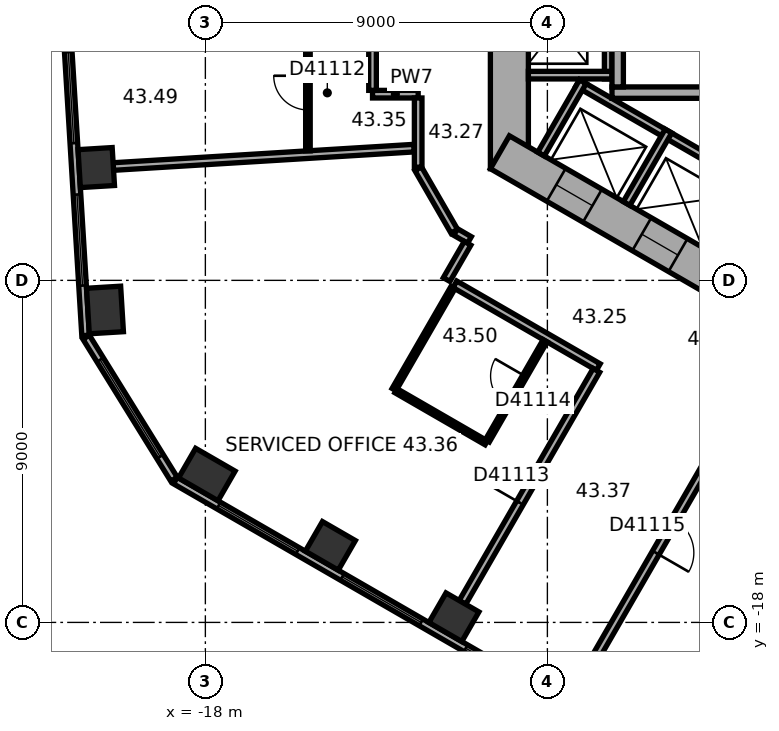
"""IFC4 building model, lengths in metres.
Left out: names, types, materials, properties, quantities, classifications, styles, units other than length and angle.
Written with IfcOpenShell. Run it as: python <this file> out.ifc"""

import sys

from ifc_helpers import new_model, si_unit, direction, frame, frame_2d, origin, origin_2d, place, context, subcontext, project, spatial, rectangle, extrude, element, fill, save


model = new_model("IFC4")
c1 = context("Model", 3, precision=1e-05, world=origin(), true_north=direction((0.0, 1.0)))
c2 = subcontext(c1, "Body", "Model", "MODEL_VIEW")
j1 = project(units=[si_unit("LENGTHUNIT", "METRE"), si_unit("PLANEANGLEUNIT", "RADIAN")], contexts=[c1])
p1 = place(None, origin())
s1 = spatial("IfcSite", under=j1, at=p1, CompositionType="ELEMENT")
p2 = place(p1, origin())
s2 = spatial("IfcBuilding", under=s1, at=p2, CompositionType="ELEMENT")
p3 = place(p2, frame((0.0, 0.0, 176.2)))
s3 = spatial("IfcBuildingStorey", under=s2, at=p3, CompositionType="ELEMENT", Elevation=176.2)
p4 = place(p3, frame((-20.871, -6.032, 0.0), z_axis=(0.0, 0.0, 1.0), x_axis=(0.061048539535, -0.998134798422, 0.0)))
e1 = element("IfcColumn", 1, at=p4, inside=s3, PredefinedType="COLUMN", context=c2, shape_type="SweptSolid", body=[
    extrude(rectangle(XDim=1.0, YDim=0.9, at=origin_2d()), origin(), (0.0, 0.0, 1.0), 3.7),
])
for number, where, z_axis, x_axis in (
    (2, (-20.642, -9.779, 0.0), (0.0, 0.0, 1.0), (0.061, -0.998, 0.0)),
    (3, (-17.962, -14.109, 0.0), (0.0, 0.0, 1.0), (0.866, -0.5, 0.0)),
):
    element("IfcColumn", number, at=place(p3, frame(where, z_axis=z_axis, x_axis=x_axis)), inside=s3, PredefinedType="COLUMN", context=c2, shape_type="SweptSolid", body=[
        extrude(rectangle(XDim=1.2, YDim=0.9, at=origin_2d()), origin(), (0.0, 0.0, 1.0), 3.7),
    ])
for number, where, z_axis, x_axis in (
    (4, (-14.711, -15.986, 0.0), (0.0, 0.0, 1.0), (0.866, -0.5, 0.0)),
    (5, (-11.46, -17.863, 0.0), (0.0, 0.0, 1.0), (0.866, -0.5, 0.0)),
):
    element("IfcColumn", number, at=place(p3, frame(where, z_axis=z_axis, x_axis=x_axis)), inside=s3, PredefinedType="COLUMN", context=c2, shape_type="SweptSolid", body=[
        extrude(rectangle(XDim=1.0, YDim=0.9, at=origin_2d()), origin(), (0.0, 0.0, 1.0), 3.7),
    ])
p5 = place(p3, frame((-10.0, 6.062, 0.0), z_axis=(0.0, 0.0, 1.0), x_axis=(0.0, -1.0, 0.0)))
e6 = element("IfcWall", 6, at=p5, inside=s3, PredefinedType="SHEAR", context=c2, shape_type="SweptSolid", body=[
    extrude(rectangle(XDim=12.125, YDim=1.0, at=frame_2d((6.062, 0.0))), origin(), (0.0, 0.0, 1.0), 3.7),
])
p6 = place(p5, frame((5.212, 0.0, 0.0)))
e7 = element("IfcOpeningElement", 7, at=p6, cuts=e6, PredefinedType="OPENING", context=c2, shape_type="SweptSolid", body=[
    extrude(rectangle(XDim=1.1, YDim=2.1, at=frame_2d((0.55, 1.05))), frame((0.0, 0.51, 0.0), z_axis=(0.0, -1.0, 0.0), x_axis=(1.0, 0.0, 0.0)), (0.0, 0.0, 1.0), 1.02),
])
p7 = place(p5, frame((7.812, 0.0, 0.0)))
e8 = element("IfcOpeningElement", 8, at=p7, cuts=e6, PredefinedType="OPENING", context=c2, shape_type="SweptSolid", body=[
    extrude(rectangle(XDim=1.1, YDim=2.1, at=frame_2d((0.55, 1.05))), frame((0.0, 0.51, 0.0), z_axis=(0.0, -1.0, 0.0), x_axis=(1.0, 0.0, 0.0)), (0.0, 0.0, 1.0), 1.02),
])
p8 = place(p3, frame((-10.25, -5.629, 0.0), z_axis=(0.0, 0.0, 1.0), x_axis=(0.866022616891, -0.50000482701, 0.0)))
e9 = element("IfcWall", 9, at=p8, inside=s3, PredefinedType="SHEAR", context=c2, shape_type="SweptSolid", body=[
    extrude(rectangle(XDim=12.125, YDim=1.0, at=frame_2d((6.062, 0.0))), origin(), (0.0, 0.0, 1.0), 3.7),
])
p9 = place(p8, frame((6.262, 0.0, 0.0)))
e10 = element("IfcOpeningElement", 10, at=p9, cuts=e9, PredefinedType="OPENING", context=c2, shape_type="SweptSolid", body=[
    extrude(rectangle(XDim=1.5, YDim=2.1, at=frame_2d((0.75, 1.05))), frame((0.0, 0.51, 0.0), z_axis=(0.0, -1.0, 0.0), x_axis=(1.0, 0.0, 0.0)), (0.0, 0.0, 1.0), 1.02),
])
p10 = place(p8, frame((1.712, 0.0, 0.0)))
e11 = element("IfcOpeningElement", 11, at=p10, cuts=e9, PredefinedType="OPENING", context=c2, shape_type="SweptSolid", body=[
    extrude(rectangle(XDim=1.1, YDim=2.1, at=frame_2d((0.55, 1.05))), frame((0.0, 0.51, 0.0), z_axis=(0.0, -1.0, 0.0), x_axis=(1.0, 0.0, 0.0)), (0.0, 0.0, 1.0), 1.02),
])
p11 = place(p8, frame((4.312, 0.0, 0.0)))
e12 = element("IfcOpeningElement", 12, at=p11, cuts=e9, PredefinedType="OPENING", context=c2, shape_type="SweptSolid", body=[
    extrude(rectangle(XDim=1.1, YDim=2.1, at=frame_2d((0.55, 1.05))), frame((0.0, 0.51, 0.0), z_axis=(0.0, -1.0, 0.0), x_axis=(1.0, 0.0, 0.0)), (0.0, 0.0, 1.0), 1.02),
])
p12 = place(p3, frame((-22.375, 9.557, 0.0), z_axis=(0.0, 0.0, 1.0), x_axis=(0.061036015339, -0.998135564356, 0.0)))
e13 = element("IfcWall", 13, at=p12, inside=s3, PredefinedType="STANDARD", context=c2, shape_type="SweptSolid", body=[
    extrude(rectangle(XDim=20.044, YDim=0.2, at=frame_2d((10.022, 0.0))), origin(), (0.0, 0.0, 1.0), 3.7),
])
p13 = place(p12, frame((1.313, 0.0, 0.9)))
e14 = element("IfcOpeningElement", 14, at=p13, cuts=e13, PredefinedType="OPENING", context=c2, shape_type="SweptSolid", body=[
    extrude(rectangle(XDim=2.4, YDim=2.0, at=frame_2d((1.2, 1.0))), frame((0.0, 0.11, 0.0), z_axis=(0.0, -1.0, 0.0), x_axis=(1.0, 0.0, 0.0)), (0.0, 0.0, 1.0), 0.22),
])
p14 = place(p12, frame((5.067, 0.0, 0.9)))
e15 = element("IfcOpeningElement", 15, at=p14, cuts=e13, PredefinedType="OPENING", context=c2, shape_type="SweptSolid", body=[
    extrude(rectangle(XDim=2.4, YDim=2.0, at=frame_2d((1.2, 1.0))), frame((0.0, 0.11, 0.0), z_axis=(0.0, -1.0, 0.0), x_axis=(1.0, 0.0, 0.0)), (0.0, 0.0, 1.0), 0.22),
])
p15 = place(p12, frame((8.821, 0.0, 0.9)))
e16 = element("IfcOpeningElement", 16, at=p15, cuts=e13, PredefinedType="OPENING", context=c2, shape_type="SweptSolid", body=[
    extrude(rectangle(XDim=2.4, YDim=2.0, at=frame_2d((1.2, 1.0))), frame((0.0, 0.11, 0.0), z_axis=(0.0, -1.0, 0.0), x_axis=(1.0, 0.0, 0.0)), (0.0, 0.0, 1.0), 0.22),
])
p16 = place(p12, frame((12.575, 0.0, 0.9)))
e17 = element("IfcOpeningElement", 17, at=p16, cuts=e13, PredefinedType="OPENING", context=c2, shape_type="SweptSolid", body=[
    extrude(rectangle(XDim=2.4, YDim=2.0, at=frame_2d((1.2, 1.0))), frame((0.0, 0.11, 0.0), z_axis=(0.0, -1.0, 0.0), x_axis=(1.0, 0.0, 0.0)), (0.0, 0.0, 1.0), 0.22),
])
p17 = place(p12, frame((16.329, 0.0, 0.9)))
e18 = element("IfcOpeningElement", 18, at=p17, cuts=e13, PredefinedType="OPENING", context=c2, shape_type="SweptSolid", body=[
    extrude(rectangle(XDim=2.4, YDim=2.0, at=frame_2d((1.2, 1.0))), frame((0.0, 0.11, 0.0), z_axis=(0.0, -1.0, 0.0), x_axis=(1.0, 0.0, 0.0)), (0.0, 0.0, 1.0), 0.22),
])
p18 = place(p3, frame((-21.137, -10.496, 0.0), z_axis=(0.0, 0.0, 1.0), x_axis=(0.526178661629, -0.850374044786, 0.0)))
e19 = element("IfcWall", 19, at=p18, inside=s3, PredefinedType="STANDARD", context=c2, shape_type="SweptSolid", body=[
    extrude(rectangle(XDim=4.395, YDim=0.2, at=frame_2d((2.197, 0.0))), origin(), (0.0, 0.0, 1.0), 3.7),
])
p19 = place(p18, frame((0.698, 0.0, 0.9)))
e20 = element("IfcOpeningElement", 20, at=p19, cuts=e19, PredefinedType="OPENING", context=c2, shape_type="SweptSolid", body=[
    extrude(rectangle(XDim=3.0, YDim=2.0, at=frame_2d((1.5, 1.0))), frame((0.0, 0.11, 0.0), z_axis=(0.0, -1.0, 0.0), x_axis=(1.0, 0.0, 0.0)), (0.0, 0.0, 1.0), 0.22),
])
p20 = place(p3, frame((-18.789, -14.267, 0.0), z_axis=(0.0, 0.0, 1.0), x_axis=(0.866023315909, -0.500003616288, 0.0)))
e21 = element("IfcWall", 21, at=p20, inside=s3, PredefinedType="STANDARD", context=c2, shape_type="SweptSolid", body=[
    extrude(rectangle(XDim=20.044, YDim=0.2, at=frame_2d((10.022, 0.0))), origin(), (0.0, 0.0, 1.0), 3.7),
])
p21 = place(p20, frame((1.314, 0.0, 0.9)))
e22 = element("IfcOpeningElement", 22, at=p21, cuts=e21, PredefinedType="OPENING", context=c2, shape_type="SweptSolid", body=[
    extrude(rectangle(XDim=2.4, YDim=2.0, at=frame_2d((1.2, 1.0))), frame((0.0, 0.11, 0.0), z_axis=(0.0, -1.0, 0.0), x_axis=(1.0, 0.0, 0.0)), (0.0, 0.0, 1.0), 0.22),
])
p22 = place(p20, frame((5.069, 0.0, 0.9)))
e23 = element("IfcOpeningElement", 23, at=p22, cuts=e21, PredefinedType="OPENING", context=c2, shape_type="SweptSolid", body=[
    extrude(rectangle(XDim=2.4, YDim=2.0, at=frame_2d((1.2, 1.0))), frame((0.0, 0.11, 0.0), z_axis=(0.0, -1.0, 0.0), x_axis=(1.0, 0.0, 0.0)), (0.0, 0.0, 1.0), 0.22),
])
p23 = place(p20, frame((8.823, 0.0, 0.9)))
e24 = element("IfcOpeningElement", 24, at=p23, cuts=e21, PredefinedType="OPENING", context=c2, shape_type="SweptSolid", body=[
    extrude(rectangle(XDim=2.4, YDim=2.0, at=frame_2d((1.2, 1.0))), frame((0.0, 0.11, 0.0), z_axis=(0.0, -1.0, 0.0), x_axis=(1.0, 0.0, 0.0)), (0.0, 0.0, 1.0), 0.22),
])
p24 = place(p20, frame((12.577, 0.0, 0.9)))
e25 = element("IfcOpeningElement", 25, at=p24, cuts=e21, PredefinedType="OPENING", context=c2, shape_type="SweptSolid", body=[
    extrude(rectangle(XDim=2.4, YDim=2.0, at=frame_2d((1.2, 1.0))), frame((0.0, 0.11, 0.0), z_axis=(0.0, -1.0, 0.0), x_axis=(1.0, 0.0, 0.0)), (0.0, 0.0, 1.0), 0.22),
])
p25 = place(p20, frame((16.331, 0.0, 0.9)))
e26 = element("IfcOpeningElement", 26, at=p25, cuts=e21, PredefinedType="OPENING", context=c2, shape_type="SweptSolid", body=[
    extrude(rectangle(XDim=2.4, YDim=2.0, at=frame_2d((1.2, 1.0))), frame((0.0, 0.11, 0.0), z_axis=(0.0, -1.0, 0.0), x_axis=(1.0, 0.0, 0.0)), (0.0, 0.0, 1.0), 0.22),
])
p26 = place(p3, frame((-7.4, 4.3, 0.0), z_axis=(0.0, 0.0, 1.0), x_axis=(0.0, -1.0, 0.0)))
e27 = element("IfcWall", 27, at=p26, inside=s3, PredefinedType="PARTITIONING", context=c2, shape_type="SweptSolid", body=[
    extrude(rectangle(XDim=8.0, YDim=0.2, at=frame_2d((4.0, 0.0))), origin(), (0.0, 0.0, 1.0), 3.42),
])
p27 = place(p3, frame((-7.3, -3.6, 0.0), z_axis=(0.0, 0.0, 1.0), x_axis=(-1.0, 0.0, 0.0)))
e28 = element("IfcWall", 28, at=p27, inside=s3, PredefinedType="PARTITIONING", context=c2, shape_type="SweptSolid", body=[
    extrude(rectangle(XDim=2.2, YDim=0.2, at=frame_2d((1.1, 0.0))), origin(), (0.0, 0.0, 1.0), 3.42),
])
p28 = place(p3, frame((-8.203, -3.809, 0.0), z_axis=(0.0, 0.0, 1.0), x_axis=(0.866028230842, -0.499995103361, 0.0)))
e29 = element("IfcWall", 29, at=p28, inside=s3, PredefinedType="PARTITIONING", context=c2, shape_type="SweptSolid", body=[
    extrude(rectangle(XDim=5.4, YDim=0.2, at=frame_2d((2.7, 0.0))), origin(), (0.0, 0.0, 1.0), 3.42),
])
for number, where, z_axis, x_axis in (
    (30, (-8.067, -3.772, 0.0), (0.0, 0.0, 1.0), (-0.5, -0.866, 0.0)),
    (31, (-5.815, -5.072, 0.0), (0.0, 0.0, 1.0), (-0.5, -0.866, 0.0)),
):
    element("IfcWall", number, at=place(p3, frame(where, z_axis=z_axis, x_axis=x_axis)), inside=s3, PredefinedType="PARTITIONING", context=c2, shape_type="SweptSolid", body=[
        extrude(rectangle(XDim=2.2, YDim=0.2, at=frame_2d((1.1, 0.0))), origin(), (0.0, 0.0, 1.0), 3.42),
    ])
p29 = place(p3, frame((-2.6, -4.06, 0.0), z_axis=(0.0, 0.0, 1.0), x_axis=(-1.0, 0.0, 0.0)))
e32 = element("IfcWall", 32, at=p29, inside=s3, PredefinedType="SHEAR", context=c2, shape_type="SweptSolid", body=[
    extrude(rectangle(XDim=4.7, YDim=0.3, at=frame_2d((2.35, 0.0))), origin(), (0.0, 0.0, 1.0), 3.42),
])
p30 = place(p3, frame((-7.15, 3.15, 0.0), z_axis=(0.0, 0.0, 1.0), x_axis=(0.0, -1.0, 0.0)))
e33 = element("IfcWall", 33, at=p30, inside=s3, PredefinedType="SHEAR", context=c2, shape_type="SweptSolid", body=[
    extrude(rectangle(XDim=7.06, YDim=0.3, at=frame_2d((3.53, 0.0))), origin(), (0.0, 0.0, 1.0), 3.42),
])
p31 = place(p3, frame((-20.421, -6.005, 0.0), z_axis=(0.0, 0.0, 1.0), x_axis=(0.998134865741, 0.061047438866, 0.0)))
e34 = element("IfcWall", 34, at=p31, inside=s3, PredefinedType="PARTITIONING", context=c2, shape_type="SweptSolid", body=[
    extrude(rectangle(XDim=7.927, YDim=0.2, at=frame_2d((3.963, 0.0))), origin(), (0.0, 0.0, 1.0), 2.87),
])
p32 = place(p3, frame((-15.301, 1.731, 0.0), z_axis=(0.0, 0.0, 1.0), x_axis=(0.0, -1.0, 0.0)))
e35 = element("IfcWall", 35, at=p32, inside=s3, PredefinedType="PARTITIONING", context=c2, shape_type="SweptSolid", body=[
    extrude(rectangle(XDim=7.322, YDim=0.12, at=frame_2d((3.661, 0.0))), origin(), (0.0, 0.0, 1.0), 3.42),
])
p33 = place(p32, frame((0.55, 0.0, 0.0)))
e36 = element("IfcOpeningElement", 36, at=p33, cuts=e35, PredefinedType="OPENING", context=c2, shape_type="SweptSolid", body=[
    extrude(rectangle(XDim=1.0, YDim=2.1, at=frame_2d((0.5, 1.05))), frame((0.0, 0.07, 0.0), z_axis=(0.0, -1.0, 0.0), x_axis=(1.0, 0.0, 0.0)), (0.0, 0.0, 1.0), 0.14),
])
p34 = place(p32, frame((2.736, 0.0, 0.0)))
e37 = element("IfcOpeningElement", 37, at=p34, cuts=e35, PredefinedType="OPENING", context=c2, shape_type="SweptSolid", body=[
    extrude(rectangle(XDim=0.9, YDim=2.1, at=frame_2d((0.45, 1.05))), frame((0.0, 0.07, 0.0), z_axis=(0.0, -1.0, 0.0), x_axis=(1.0, 0.0, 0.0)), (0.0, 0.0, 1.0), 0.14),
])
p35 = place(p32, frame((5.347, 0.0, 0.0)))
e38 = element("IfcOpeningElement", 38, at=p35, cuts=e35, PredefinedType="OPENING", context=c2, shape_type="SweptSolid", body=[
    extrude(rectangle(XDim=0.9, YDim=2.1, at=frame_2d((0.45, 1.05))), frame((0.0, 0.07, 0.0), z_axis=(0.0, -1.0, 0.0), x_axis=(1.0, 0.0, 0.0)), (0.0, 0.0, 1.0), 0.14),
])
p36 = place(p3, frame((-13.601, -4.101, 0.0), z_axis=(0.0, 0.0, 1.0), x_axis=(1.0, 0.0, 0.0)))
e39 = element("IfcWall", 39, at=p36, inside=s3, PredefinedType="PARTITIONING", context=c2, shape_type="SweptSolid", body=[
    extrude(rectangle(XDim=1.201, YDim=0.2, at=frame_2d((0.601, 0.0))), origin(), (0.0, 0.0, 1.0), 3.42),
])
p37 = place(p3, frame((-13.601, 1.935, 0.0), z_axis=(0.0, 0.0, 1.0), x_axis=(0.0, -1.0, 0.0)))
e40 = element("IfcWall", 40, at=p37, inside=s3, PredefinedType="PARTITIONING", context=c2, shape_type="SweptSolid", body=[
    extrude(rectangle(XDim=5.936, YDim=0.2, at=frame_2d((2.968, 0.0))), origin(), (0.0, 0.0, 1.0), 3.42),
])
p38 = place(p37, frame((2.468, 0.0, 0.0)))
e41 = element("IfcOpeningElement", 41, at=p38, cuts=e40, PredefinedType="OPENING", context=c2, shape_type="SweptSolid", body=[
    extrude(rectangle(XDim=1.0, YDim=2.1, at=frame_2d((0.5, 1.05))), frame((0.0, 0.11, 0.0), z_axis=(0.0, -1.0, 0.0), x_axis=(1.0, 0.0, 0.0)), (0.0, 0.0, 1.0), 0.22),
])
p39 = place(p3, frame((-13.035, -11.875, 0.0), z_axis=(0.0, 0.0, 1.0), x_axis=(0.500026960575, 0.86600983753, 0.0)))
e42 = element("IfcWall", 42, at=p39, inside=s3, PredefinedType="PARTITIONING", context=c2, shape_type="SweptSolid", body=[
    extrude(rectangle(XDim=3.1, YDim=0.12, at=frame_2d((1.55, 0.0))), origin(), (0.0, 0.0, 1.0), 3.42),
])
p40 = place(p3, frame((-12.4, -6.062, 0.0), z_axis=(0.0, 0.0, 1.0), x_axis=(0.500022797313, -0.86601224135, 0.0)))
e43 = element("IfcWall", 43, at=p40, inside=s3, PredefinedType="PARTITIONING", context=c2, shape_type="SweptSolid", body=[
    extrude(rectangle(XDim=1.9, YDim=0.2, at=frame_2d((0.95, 0.0))), origin(), (0.0, 0.0, 1.0), 3.42),
])
p41 = place(p3, frame((-12.4, -4.201, 0.0), z_axis=(0.0, 0.0, 1.0), x_axis=(0.0, -1.0, 0.0)))
e44 = element("IfcWall", 44, at=p41, inside=s3, PredefinedType="PARTITIONING", context=c2, shape_type="SweptSolid", body=[
    extrude(rectangle(XDim=1.821, YDim=0.2, at=frame_2d((0.911, 0.0))), origin(), (0.0, 0.0, 1.0), 3.42),
])
p42 = place(p3, frame((-11.435, -9.103, 0.0), z_axis=(0.0, 0.0, 1.0), x_axis=(0.866007399799, -0.500031182522, 0.0)))
e45 = element("IfcWall", 45, at=p42, inside=s3, PredefinedType="PARTITIONING", context=c2, shape_type="SweptSolid", body=[
    extrude(rectangle(XDim=4.358, YDim=0.2, at=frame_2d((2.179, 0.0))), origin(), (0.0, 0.0, 1.0), 3.42),
])
p43 = place(p3, frame((-11.415, -7.728, 0.0), z_axis=(0.0, 0.0, 1.0), x_axis=(0.865915281873, -0.500190688257, 0.0)))
e46 = element("IfcWall", 46, at=p43, inside=s3, PredefinedType="PARTITIONING", context=c2, shape_type="SweptSolid", body=[
    extrude(rectangle(XDim=0.421, YDim=0.2, at=frame_2d((0.21, 0.0))), origin(), (0.0, 0.0, 1.0), 3.42),
])
p44 = place(p3, frame((-11.235, -17.474, 0.0), z_axis=(0.0, 0.0, 1.0), x_axis=(0.500009260695, 0.866020057054, 0.0)))
e47 = element("IfcWall", 47, at=p44, inside=s3, PredefinedType="PARTITIONING", context=c2, shape_type="SweptSolid", body=[
    extrude(rectangle(XDim=7.049, YDim=0.2, at=frame_2d((3.524, 0.0))), origin(), (0.0, 0.0, 1.0), 2.87),
])
p45 = place(p44, frame((3.024, 0.0, 0.0)))
e48 = element("IfcOpeningElement", 48, at=p45, cuts=e47, PredefinedType="OPENING", context=c2, shape_type="SweptSolid", body=[
    extrude(rectangle(XDim=1.0, YDim=2.1, at=frame_2d((0.5, 1.05))), frame((0.0, 0.11, 0.0), z_axis=(0.0, -1.0, 0.0), x_axis=(1.0, 0.0, 0.0)), (0.0, 0.0, 1.0), 0.22),
])
p46 = place(p3, frame((-11.101, -8.025, 0.0), z_axis=(0.0, 0.0, 1.0), x_axis=(-0.500074377092, -0.865982457891, 0.0)))
e49 = element("IfcWall", 49, at=p46, inside=s3, PredefinedType="PARTITIONING", context=c2, shape_type="SweptSolid", body=[
    extrude(rectangle(XDim=1.101, YDim=0.2, at=frame_2d((0.55, 0.0))), origin(), (0.0, 0.0, 1.0), 3.42),
])
p47 = place(p3, frame((-10.61, -13.275, 0.0), z_axis=(0.0, 0.0, 1.0), x_axis=(-0.866019409031, 0.500010383074, 0.0)))
e50 = element("IfcWall", 50, at=p47, inside=s3, PredefinedType="PARTITIONING", context=c2, shape_type="SweptSolid", body=[
    extrude(rectangle(XDim=2.74, YDim=0.12, at=frame_2d((1.37, 0.0))), origin(), (0.0, 0.0, 1.0), 3.42),
])
p48 = place(p3, frame((-9.06, -10.59, 0.0), z_axis=(0.0, 0.0, 1.0), x_axis=(-0.49993101378, -0.866065229334, 0.0)))
e51 = element("IfcWall", 51, at=p48, inside=s3, PredefinedType="PARTITIONING", context=c2, shape_type="SweptSolid", body=[
    extrude(rectangle(XDim=3.04, YDim=0.12, at=frame_2d((1.52, 0.0))), origin(), (0.0, 0.0, 1.0), 3.42),
])
p49 = place(p48, frame((1.07, 0.0, 0.0)))
e52 = element("IfcOpeningElement", 52, at=p49, cuts=e51, PredefinedType="OPENING", context=c2, shape_type="SweptSolid", body=[
    extrude(rectangle(XDim=0.9, YDim=2.1, at=frame_2d((0.45, 1.05))), frame((0.0, 0.07, 0.0), z_axis=(0.0, -1.0, 0.0), x_axis=(1.0, 0.0, 0.0)), (0.0, 0.0, 1.0), 0.14),
])
p50 = place(p3, frame((-7.984, -19.351, 0.0), z_axis=(0.0, 0.0, 1.0), x_axis=(0.500010139422, 0.866019549707, 0.0)))
e53 = element("IfcWall", 53, at=p50, inside=s3, PredefinedType="PARTITIONING", context=c2, shape_type="SweptSolid", body=[
    extrude(rectangle(XDim=8.35, YDim=0.2, at=frame_2d((4.175, 0.0))), origin(), (0.0, 0.0, 1.0), 3.42),
])
p51 = place(p50, frame((3.675, 0.0, 0.0)))
e54 = element("IfcOpeningElement", 54, at=p51, cuts=e53, PredefinedType="OPENING", context=c2, shape_type="SweptSolid", body=[
    extrude(rectangle(XDim=1.0, YDim=2.1, at=frame_2d((0.5, 1.05))), frame((0.0, 0.11, 0.0), z_axis=(0.0, -1.0, 0.0), x_axis=(1.0, 0.0, 0.0)), (0.0, 0.0, 1.0), 0.22),
])
p52 = place(p16, origin())
e55 = element("IfcWindow", 55, at=p52, inside=s3, PartitioningType="SINGLE_PANEL", PredefinedType="WINDOW", context=c2, shape_type="SweptSolid", body=[
    extrude(rectangle(XDim=2.4, YDim=2.0, at=frame_2d((1.2, 1.0))), frame((0.0, 0.03, 0.0), z_axis=(0.0, -1.0, 0.0), x_axis=(1.0, 0.0, 0.0)), (0.0, 0.0, 1.0), 0.06),
])
fill(e17, e55)
p53 = place(p17, origin())
e56 = element("IfcWindow", 56, at=p53, inside=s3, PartitioningType="SINGLE_PANEL", PredefinedType="WINDOW", context=c2, shape_type="SweptSolid", body=[
    extrude(rectangle(XDim=2.4, YDim=2.0, at=frame_2d((1.2, 1.0))), frame((0.0, 0.03, 0.0), z_axis=(0.0, -1.0, 0.0), x_axis=(1.0, 0.0, 0.0)), (0.0, 0.0, 1.0), 0.06),
])
fill(e18, e56)
p54 = place(p19, origin())
e57 = element("IfcWindow", 57, at=p54, inside=s3, PartitioningType="SINGLE_PANEL", PredefinedType="WINDOW", context=c2, shape_type="SweptSolid", body=[
    extrude(rectangle(XDim=3.0, YDim=2.0, at=frame_2d((1.5, 1.0))), frame((0.0, 0.03, 0.0), z_axis=(0.0, -1.0, 0.0), x_axis=(1.0, 0.0, 0.0)), (0.0, 0.0, 1.0), 0.06),
])
fill(e20, e57)
p55 = place(p21, origin())
e58 = element("IfcWindow", 58, at=p55, inside=s3, PartitioningType="SINGLE_PANEL", PredefinedType="WINDOW", context=c2, shape_type="SweptSolid", body=[
    extrude(rectangle(XDim=2.4, YDim=2.0, at=frame_2d((1.2, 1.0))), frame((0.0, 0.03, 0.0), z_axis=(0.0, -1.0, 0.0), x_axis=(1.0, 0.0, 0.0)), (0.0, 0.0, 1.0), 0.06),
])
fill(e22, e58)
p56 = place(p22, origin())
e59 = element("IfcWindow", 59, at=p56, inside=s3, PartitioningType="SINGLE_PANEL", PredefinedType="WINDOW", context=c2, shape_type="SweptSolid", body=[
    extrude(rectangle(XDim=2.4, YDim=2.0, at=frame_2d((1.2, 1.0))), frame((0.0, 0.03, 0.0), z_axis=(0.0, -1.0, 0.0), x_axis=(1.0, 0.0, 0.0)), (0.0, 0.0, 1.0), 0.06),
])
fill(e23, e59)
p57 = place(p23, origin())
e60 = element("IfcWindow", 60, at=p57, inside=s3, PartitioningType="SINGLE_PANEL", PredefinedType="WINDOW", context=c2, shape_type="SweptSolid", body=[
    extrude(rectangle(XDim=2.4, YDim=2.0, at=frame_2d((1.2, 1.0))), frame((0.0, 0.03, 0.0), z_axis=(0.0, -1.0, 0.0), x_axis=(1.0, 0.0, 0.0)), (0.0, 0.0, 1.0), 0.06),
])
fill(e24, e60)
p58 = place(p10, origin())
e61 = element("IfcDoor", 61, at=p58, inside=s3, OperationType="DOUBLE_DOOR_SLIDING", PredefinedType="DOOR", context=c2, shape_type="SweptSolid", body=[
    extrude(rectangle(XDim=1.1, YDim=2.1, at=frame_2d((0.55, 1.05))), frame((0.0, 0.025, 0.0), z_axis=(0.0, -1.0, 0.0), x_axis=(1.0, 0.0, 0.0)), (0.0, 0.0, 1.0), 0.05),
])
fill(e11, e61)
p59 = place(p11, origin())
e62 = element("IfcDoor", 62, at=p59, inside=s3, OperationType="DOUBLE_DOOR_SLIDING", PredefinedType="DOOR", context=c2, shape_type="SweptSolid", body=[
    extrude(rectangle(XDim=1.1, YDim=2.1, at=frame_2d((0.55, 1.05))), frame((0.0, 0.025, 0.0), z_axis=(0.0, -1.0, 0.0), x_axis=(1.0, 0.0, 0.0)), (0.0, 0.0, 1.0), 0.05),
])
fill(e12, e62)
p60 = place(p35, origin())
e63 = element("IfcDoor", 63, at=p60, inside=s3, OperationType="SINGLE_SWING_LEFT", PredefinedType="DOOR", context=c2, shape_type="SweptSolid", body=[
    extrude(rectangle(XDim=0.9, YDim=2.1, at=frame_2d((0.45, 1.05))), frame((0.0, 0.025, 0.0), z_axis=(0.0, -1.0, 0.0), x_axis=(1.0, 0.0, 0.0)), (0.0, 0.0, 1.0), 0.05),
])
fill(e38, e63)
p61 = place(p45, origin())
e64 = element("IfcDoor", 64, at=p61, inside=s3, OperationType="SINGLE_SWING_LEFT", PredefinedType="DOOR", context=c2, shape_type="SweptSolid", body=[
    extrude(rectangle(XDim=1.0, YDim=2.1, at=frame_2d((0.5, 1.05))), frame((0.0, 0.025, 0.0), z_axis=(0.0, -1.0, 0.0), x_axis=(1.0, 0.0, 0.0)), (0.0, 0.0, 1.0), 0.05),
])
fill(e48, e64)
p62 = place(p49, origin())
e65 = element("IfcDoor", 65, at=p62, inside=s3, OperationType="SINGLE_SWING_LEFT", PredefinedType="DOOR", context=c2, shape_type="SweptSolid", body=[
    extrude(rectangle(XDim=0.9, YDim=2.1, at=frame_2d((0.45, 1.05))), frame((0.0, 0.025, 0.0), z_axis=(0.0, -1.0, 0.0), x_axis=(1.0, 0.0, 0.0)), (0.0, 0.0, 1.0), 0.05),
])
fill(e52, e65)
p63 = place(p51, origin())
e66 = element("IfcDoor", 66, at=p63, inside=s3, OperationType="SINGLE_SWING_LEFT", PredefinedType="DOOR", context=c2, shape_type="SweptSolid", body=[
    extrude(rectangle(XDim=1.0, YDim=2.1, at=frame_2d((0.5, 1.05))), frame((0.0, 0.025, 0.0), z_axis=(0.0, -1.0, 0.0), x_axis=(1.0, 0.0, 0.0)), (0.0, 0.0, 1.0), 0.05),
])
fill(e54, e66)
save(model, sys.argv[1])
